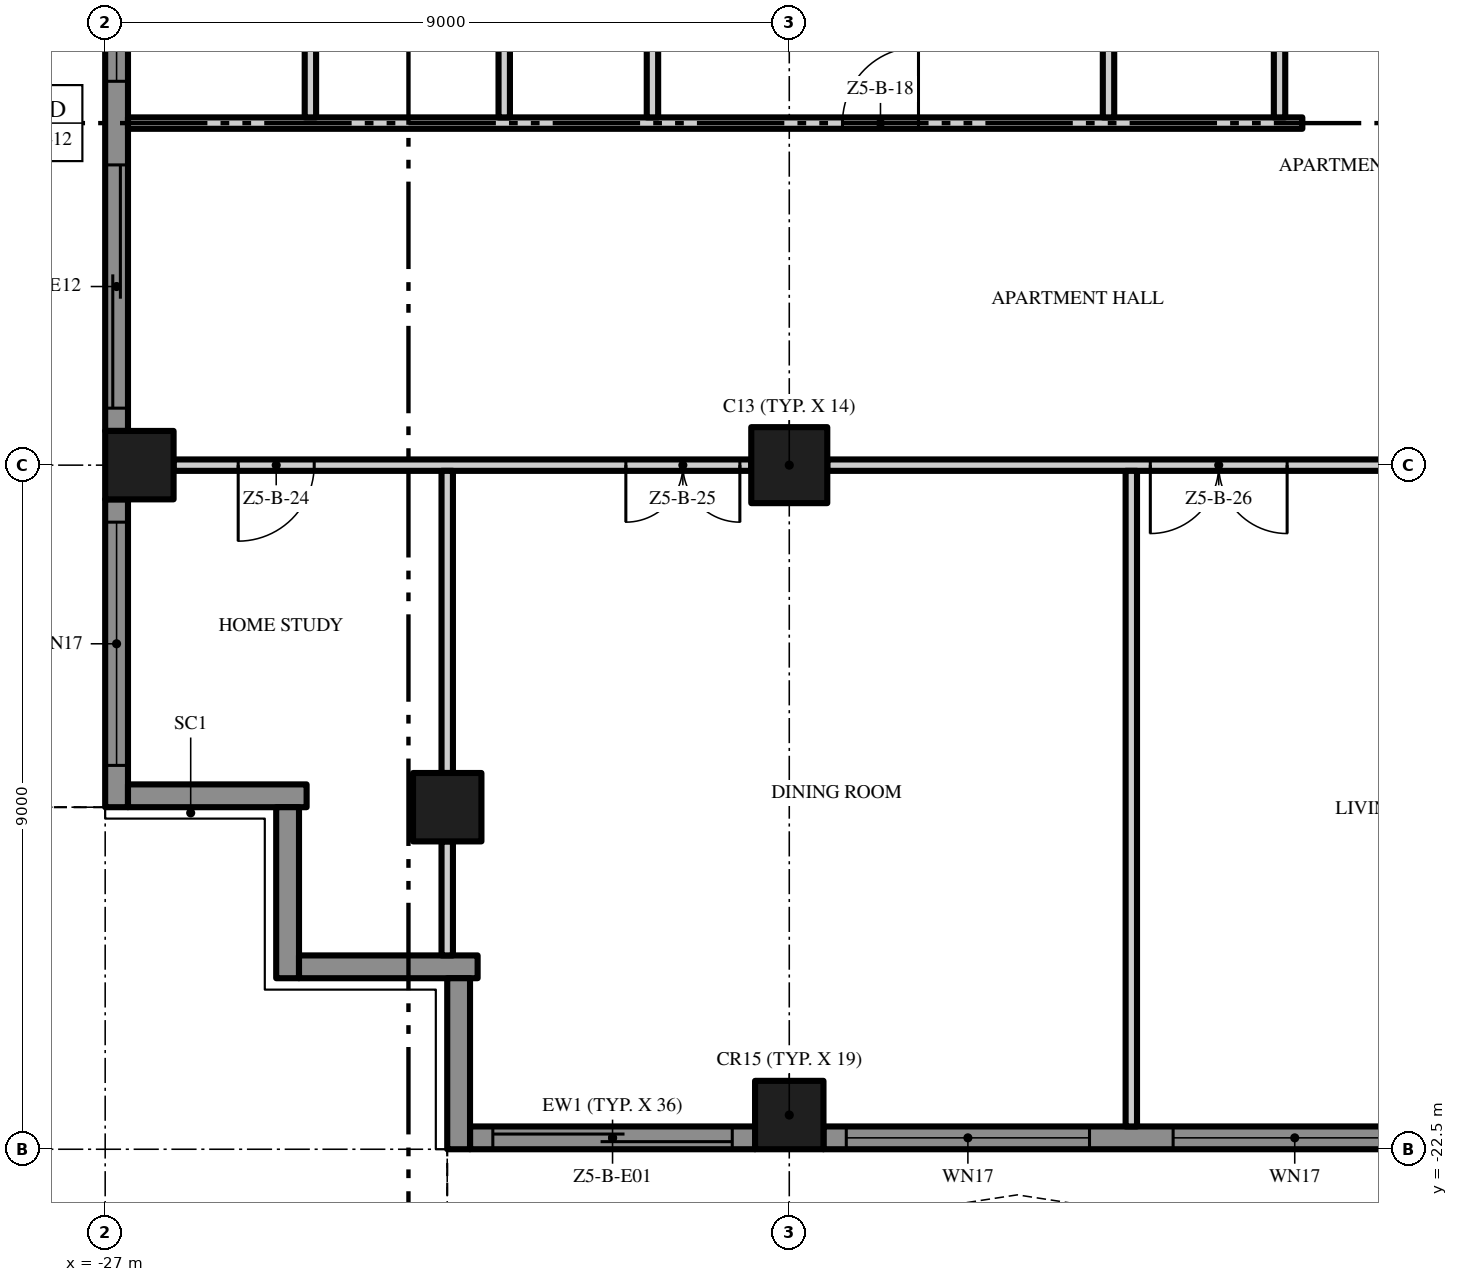
"""IFC4 building model, lengths in metres.
Left out: names, types, materials, properties, quantities, classifications, styles, units other than length and angle.
Written with IfcOpenShell. Run it as: python <this file> out.ifc"""

import sys

from ifc_helpers import new_model, si_unit, direction, frame, frame_2d, origin, origin_2d, place, context, subcontext, project, spatial, polyline, rectangle, outline, extrude, element, fill, save


model = new_model("IFC4")
c1 = context("Model", 3, precision=1e-05, world=origin(), true_north=direction((0.0, 1.0)))
c2 = subcontext(c1, "Body", "Model", "MODEL_VIEW")
j1 = project(units=[si_unit("LENGTHUNIT", "METRE"), si_unit("PLANEANGLEUNIT", "RADIAN")], contexts=[c1])
p1 = place(None, origin())
s1 = spatial("IfcSite", under=j1, at=p1, CompositionType="ELEMENT")
p2 = place(p1, origin())
s2 = spatial("IfcBuilding", under=s1, at=p2, CompositionType="ELEMENT")
p3 = place(p2, frame((0.0, 0.0, 250.2)))
s3 = spatial("IfcBuildingStorey", under=s2, at=p3, CompositionType="ELEMENT", Elevation=250.2)
p4 = place(p3, frame((-18.0, -13.5, 0.0), z_axis=(0.0, 0.0, 1.0), x_axis=(1.0, 0.0, 0.0)))
e1 = element("IfcColumn", 1, at=p4, inside=s3, PredefinedType="COLUMN", context=c2, shape_type="SweptSolid", body=[
    extrude(rectangle(XDim=1.0, YDim=1.0, at=origin_2d()), origin(), (0.0, 0.0, 1.0), 3.5),
])
for number, where, z_axis, x_axis in (
    (2, (-18.0, -22.05, 0.0), (0.0, 0.0, 1.0), (1.0, 0.0, 0.0)),
    (3, (-26.55, -13.5, 0.0), (0.0, 0.0, 1.0), (1.0, 0.0, 0.0)),
    (4, (-22.5, -18.0, 0.0), (0.0, 0.0, 1.0), (1.0, 0.0, 0.0)),
):
    element("IfcColumn", number, at=place(p3, frame(where, z_axis=z_axis, x_axis=x_axis)), inside=s3, PredefinedType="COLUMN", context=c2, shape_type="SweptSolid", body=[
        extrude(rectangle(XDim=0.9, YDim=0.9, at=origin_2d()), origin(), (0.0, 0.0, 1.0), 3.5),
    ])
p5 = place(p3, frame((-18.45, -22.35, 0.0), z_axis=(0.0, 0.0, 1.0), x_axis=(-1.0, 0.0, 0.0)))
e5 = element("IfcWall", 5, at=p5, inside=s3, PredefinedType="SOLIDWALL", context=c2, shape_type="SweptSolid", body=[
    extrude(rectangle(XDim=3.75, YDim=0.3, at=frame_2d((1.875, 0.0))), origin(), (0.0, 0.0, 1.0), 3.5),
])
p6 = place(p5, frame((0.3, 0.0, 0.0)))
e6 = element("IfcOpeningElement", 6, at=p6, cuts=e5, PredefinedType="OPENING", context=c2, shape_type="SweptSolid", body=[
    extrude(rectangle(XDim=3.15, YDim=2.4, at=frame_2d((1.575, 1.2))), frame((0.0, 0.16, 0.0), z_axis=(0.0, -1.0, 0.0), x_axis=(1.0, 0.0, 0.0)), (0.0, 0.0, 1.0), 0.32),
])
p7 = place(p3, frame((-9.45, -22.35, 0.0), z_axis=(0.0, 0.0, 1.0), x_axis=(-1.0, 0.0, 0.0)))
e7 = element("IfcWall", 7, at=p7, inside=s3, PredefinedType="SOLIDWALL", context=c2, shape_type="SweptSolid", body=[
    extrude(rectangle(XDim=8.1, YDim=0.3, at=frame_2d((4.05, 0.0))), origin(), (0.0, 0.0, 1.0), 3.5),
])
p8 = place(p7, frame((4.6, 0.0, 0.45)))
e8 = element("IfcOpeningElement", 8, at=p8, cuts=e7, PredefinedType="OPENING", context=c2, shape_type="SweptSolid", body=[
    extrude(rectangle(XDim=3.2, YDim=2.65, at=frame_2d((1.6, 1.325))), frame((0.0, 0.16, 0.0), z_axis=(0.0, -1.0, 0.0), x_axis=(1.0, 0.0, 0.0)), (0.0, 0.0, 1.0), 0.32),
])
p9 = place(p7, frame((0.3, 0.0, 0.45)))
e9 = element("IfcOpeningElement", 9, at=p9, cuts=e7, PredefinedType="OPENING", context=c2, shape_type="SweptSolid", body=[
    extrude(rectangle(XDim=3.2, YDim=2.65, at=frame_2d((1.6, 1.325))), frame((0.0, 0.16, 0.0), z_axis=(0.0, -1.0, 0.0), x_axis=(1.0, 0.0, 0.0)), (0.0, 0.0, 1.0), 0.32),
])
p10 = place(p3, frame((-26.85, -13.05, 0.0), z_axis=(0.0, 0.0, 1.0), x_axis=(0.0, 1.0, 0.0)))
e10 = element("IfcWall", 10, at=p10, inside=s3, PredefinedType="SOLIDWALL", context=c2, shape_type="SweptSolid", body=[
    extrude(rectangle(XDim=8.1, YDim=0.3, at=frame_2d((4.05, 0.0))), origin(), (0.0, 0.0, 1.0), 3.5),
])
p11 = place(p10, frame((4.6, 0.0, 0.45)))
e11 = element("IfcOpeningElement", 11, at=p11, cuts=e10, PredefinedType="OPENING", context=c2, shape_type="SweptSolid", body=[
    extrude(rectangle(XDim=3.2, YDim=2.65, at=frame_2d((1.6, 1.325))), frame((0.0, 0.16, 0.0), z_axis=(0.0, -1.0, 0.0), x_axis=(1.0, 0.0, 0.0)), (0.0, 0.0, 1.0), 0.32),
])
p12 = place(p10, frame((0.3, 0.0, 0.0)))
e12 = element("IfcOpeningElement", 12, at=p12, cuts=e10, PredefinedType="OPENING", context=c2, shape_type="SweptSolid", body=[
    extrude(rectangle(XDim=3.2, YDim=2.4, at=frame_2d((1.6, 1.2))), frame((0.0, 0.16, 0.0), z_axis=(0.0, -1.0, 0.0), x_axis=(1.0, 0.0, 0.0)), (0.0, 0.0, 1.0), 0.32),
])
p13 = place(p3, frame((-26.85, -18.0, 0.0), z_axis=(0.0, 0.0, 1.0), x_axis=(0.0, 1.0, 0.0)))
e13 = element("IfcWall", 13, at=p13, inside=s3, PredefinedType="SOLIDWALL", context=c2, shape_type="SweptSolid", body=[
    extrude(rectangle(XDim=4.05, YDim=0.3, at=frame_2d((2.025, 0.0))), origin(), (0.0, 0.0, 1.0), 3.5),
])
p14 = place(p13, frame((0.55, 0.0, 0.45)))
e14 = element("IfcOpeningElement", 14, at=p14, cuts=e13, PredefinedType="OPENING", context=c2, shape_type="SweptSolid", body=[
    extrude(rectangle(XDim=3.2, YDim=2.65, at=frame_2d((1.6, 1.325))), frame((0.0, 0.16, 0.0), z_axis=(0.0, -1.0, 0.0), x_axis=(1.0, 0.0, 0.0)), (0.0, 0.0, 1.0), 0.32),
])
p15 = place(p3, frame((-24.35, -17.85, 0.0), z_axis=(0.0, 0.0, 1.0), x_axis=(-1.0, 0.0, 0.0)))
e15 = element("IfcWall", 15, at=p15, inside=s3, PredefinedType="SOLIDWALL", context=c2, shape_type="SweptSolid", body=[
    extrude(rectangle(XDim=2.35, YDim=0.3, at=frame_2d((1.175, 0.0))), origin(), (0.0, 0.0, 1.0), 3.5),
])
p16 = place(p3, frame((-24.6, -20.25, 0.0), z_axis=(0.0, 0.0, 1.0), x_axis=(0.0, 1.0, 0.0)))
e16 = element("IfcWall", 16, at=p16, inside=s3, PredefinedType="SOLIDWALL", context=c2, shape_type="SweptSolid", body=[
    extrude(rectangle(XDim=2.25, YDim=0.3, at=frame_2d((1.125, 0.0))), origin(), (0.0, 0.0, 1.0), 3.5),
])
p17 = place(p3, frame((-22.1, -20.1, 0.0), z_axis=(0.0, 0.0, 1.0), x_axis=(-1.0, 0.0, 0.0)))
e17 = element("IfcWall", 17, at=p17, inside=s3, PredefinedType="SOLIDWALL", context=c2, shape_type="SweptSolid", body=[
    extrude(rectangle(XDim=2.35, YDim=0.3, at=frame_2d((1.175, 0.0))), origin(), (0.0, 0.0, 1.0), 3.5),
])
p18 = place(p3, frame((-22.35, -22.5, 0.0), z_axis=(0.0, 0.0, 1.0), x_axis=(0.0, 1.0, 0.0)))
e18 = element("IfcWall", 18, at=p18, inside=s3, PredefinedType="SOLIDWALL", context=c2, shape_type="SweptSolid", body=[
    extrude(rectangle(XDim=2.25, YDim=0.3, at=frame_2d((1.125, 0.0))), origin(), (0.0, 0.0, 1.0), 3.5),
])
p19 = place(p3, origin())
e19 = element("IfcWall", 19, at=p19, inside=s3, PredefinedType="USERDEFINED", context=c2, shape_type="SweptSolid", body=[
    extrude(outline(polyline([(-22.5, -25.5), (-21.0, -25.271), (-19.5, -24.671), (-18.0, -23.929), (-16.5, -23.329), (-15.0, -23.1), (-13.5, -23.329), (-12.0, -23.929), (-10.5, -24.671), (-9.0, -25.271), (-7.5, -25.5), (-6.0, -25.271), (-4.5, -24.671), (-3.0, -23.929), (-1.5, -23.329), (0.0, -23.1), (1.5, -23.329), (3.0, -23.929), (4.5, -24.671), (6.0, -25.271), (7.5, -25.5), (9.0, -25.271), (10.5, -24.671), (12.0, -23.929), (13.5, -23.329), (15.0, -23.1), (16.5, -23.329), (18.0, -23.929), (19.5, -24.671), (21.0, -25.271), (22.5, -25.5), (22.538, -25.253), (21.066, -25.028), (19.602, -24.442), (18.102, -23.701), (16.566, -23.086), (15.0, -22.847), (13.434, -23.086), (11.898, -23.701), (10.398, -24.442), (8.934, -25.028), (7.5, -25.247), (6.066, -25.028), (4.602, -24.442), (3.102, -23.701), (1.566, -23.086), (0.0, -22.847), (-1.566, -23.086), (-3.102, -23.701), (-4.602, -24.442), (-6.066, -25.028), (-7.5, -25.247), (-8.934, -25.028), (-10.398, -24.442), (-11.898, -23.701), (-13.434, -23.086), (-15.0, -22.847), (-16.566, -23.086), (-18.102, -23.701), (-19.602, -24.442), (-21.066, -25.028), (-22.538, -25.253), (-22.5, -25.5)])), origin(), (0.0, 0.0, 1.0), 0.9),
])
p20 = place(p3, origin())
e20 = element("IfcWall", 20, at=p20, inside=s3, PredefinedType="USERDEFINED", context=c2, shape_type="SweptSolid", body=[
    extrude(outline(polyline([(-30.0, 18.0), (-29.771, 16.5), (-29.171, 15.0), (-28.429, 13.5), (-27.829, 12.0), (-27.6, 10.5), (-27.829, 9.0), (-28.429, 7.5), (-29.171, 6.0), (-29.771, 4.5), (-30.0, 3.0), (-29.771, 1.5), (-29.171, 0.0), (-28.429, -1.5), (-27.829, -3.0), (-27.6, -4.5), (-27.829, -6.0), (-28.429, -7.5), (-29.171, -9.0), (-29.771, -10.5), (-30.0, -12.0), (-29.771, -13.5), (-29.171, -15.0), (-28.429, -16.5), (-27.829, -18.0), (-27.597, -17.907), (-28.201, -16.398), (-28.942, -14.898), (-29.528, -13.434), (-29.747, -12.0), (-29.528, -10.566), (-28.942, -9.102), (-28.201, -7.602), (-27.586, -6.066), (-27.347, -4.5), (-27.586, -2.934), (-28.201, -1.398), (-28.942, 0.102), (-29.528, 1.566), (-29.747, 3.0), (-29.528, 4.434), (-28.942, 5.898), (-28.201, 7.398), (-27.586, 8.934), (-27.347, 10.5), (-27.586, 12.066), (-28.201, 13.602), (-28.942, 15.102), (-29.528, 16.566), (-29.753, 18.038), (-30.0, 18.0)])), origin(), (0.0, 0.0, 1.0), 0.9),
])
p21 = place(p3, frame((-18.5, -13.5, 0.0), z_axis=(0.0, 0.0, 1.0), x_axis=(-1.0, 0.0, 0.0)))
e21 = element("IfcWall", 21, at=p21, inside=s3, PredefinedType="PARTITIONING", context=c2, shape_type="SweptSolid", body=[
    extrude(rectangle(XDim=7.6, YDim=0.15, at=frame_2d((3.8, 0.0))), origin(), (0.0, 0.0, 1.0), 3.5),
])
p22 = place(p21, frame((5.75, 0.0, 0.0)))
e22 = element("IfcOpeningElement", 22, at=p22, cuts=e21, PredefinedType="OPENING", context=c2, shape_type="SweptSolid", body=[
    extrude(rectangle(XDim=1.0, YDim=2.4, at=frame_2d((0.5, 1.2))), frame((0.0, 0.085, 0.0), z_axis=(0.0, -1.0, 0.0), x_axis=(1.0, 0.0, 0.0)), (0.0, 0.0, 1.0), 0.17),
])
p23 = place(p21, frame((0.15, 0.0, 0.0)))
e23 = element("IfcOpeningElement", 23, at=p23, cuts=e21, PredefinedType="OPENING", context=c2, shape_type="SweptSolid", body=[
    extrude(rectangle(XDim=1.5, YDim=2.4, at=frame_2d((0.75, 1.2))), frame((0.0, 0.085, 0.0), z_axis=(0.0, -1.0, 0.0), x_axis=(1.0, 0.0, 0.0)), (0.0, 0.0, 1.0), 0.17),
])
p24 = place(p3, frame((-9.5, -13.5, 0.0), z_axis=(0.0, 0.0, 1.0), x_axis=(-1.0, 0.0, 0.0)))
e24 = element("IfcWall", 24, at=p24, inside=s3, PredefinedType="PARTITIONING", context=c2, shape_type="SweptSolid", body=[
    extrude(rectangle(XDim=8.0, YDim=0.15, at=frame_2d((4.0, 0.0))), origin(), (0.0, 0.0, 1.0), 3.5),
])
p25 = place(p24, frame((1.95, 0.0, 0.0)))
e25 = element("IfcOpeningElement", 25, at=p25, cuts=e24, PredefinedType="OPENING", context=c2, shape_type="SweptSolid", body=[
    extrude(rectangle(XDim=1.8, YDim=2.4, at=frame_2d((0.9, 1.2))), frame((0.0, 0.085, 0.0), z_axis=(0.0, -1.0, 0.0), x_axis=(1.0, 0.0, 0.0)), (0.0, 0.0, 1.0), 0.17),
])
p26 = place(p3, frame((-26.7, -9.0, 0.0), z_axis=(0.0, 0.0, 1.0), x_axis=(1.0, 0.0, 0.0)))
e26 = element("IfcWall", 26, at=p26, inside=s3, PredefinedType="PARTITIONING", context=c2, shape_type="SweptSolid", body=[
    extrude(rectangle(XDim=15.45, YDim=0.15, at=frame_2d((7.725, 0.0))), origin(), (0.0, 0.0, 1.0), 3.5),
])
p27 = place(p26, frame((9.4, 0.0, 0.0)))
e27 = element("IfcOpeningElement", 27, at=p27, cuts=e26, PredefinedType="OPENING", context=c2, shape_type="SweptSolid", body=[
    extrude(rectangle(XDim=1.0, YDim=2.4, at=frame_2d((0.5, 1.2))), frame((0.0, 0.085, 0.0), z_axis=(0.0, -1.0, 0.0), x_axis=(1.0, 0.0, 0.0)), (0.0, 0.0, 1.0), 0.17),
])
p28 = place(p3, frame((-24.3, -8.925, 0.0), z_axis=(0.0, 0.0, 1.0), x_axis=(0.0, 1.0, 0.0)))
e28 = element("IfcWall", 28, at=p28, inside=s3, PredefinedType="PARTITIONING", context=c2, shape_type="SweptSolid", body=[
    extrude(rectangle(XDim=4.35, YDim=0.15, at=frame_2d((2.175, 0.0))), origin(), (0.0, 0.0, 1.0), 3.5),
])
p29 = place(p3, frame((-22.5, -19.95, 0.0), z_axis=(0.0, 0.0, 1.0), x_axis=(0.0, 1.0, 0.0)))
e29 = element("IfcWall", 29, at=p29, inside=s3, PredefinedType="PARTITIONING", context=c2, shape_type="SweptSolid", body=[
    extrude(rectangle(XDim=1.5, YDim=0.15, at=frame_2d((0.75, 0.0))), origin(), (0.0, 0.0, 1.0), 3.5),
])
p30 = place(p3, frame((-22.5, -17.55, 0.0), z_axis=(0.0, 0.0, 1.0), x_axis=(0.0, 1.0, 0.0)))
e30 = element("IfcWall", 30, at=p30, inside=s3, PredefinedType="PARTITIONING", context=c2, shape_type="SweptSolid", body=[
    extrude(rectangle(XDim=3.975, YDim=0.15, at=frame_2d((1.988, 0.0))), origin(), (0.0, 0.0, 1.0), 3.5),
])
for number, where, z_axis, x_axis in (
    (31, (-21.75, -8.925, 0.0), (0.0, 0.0, 1.0), (0.0, 1.0, 0.0)),
    (32, (-19.8, -8.925, 0.0), (0.0, 0.0, 1.0), (0.0, 1.0, 0.0)),
    (33, (-13.8, -8.925, 0.0), (0.0, 0.0, 1.0), (0.0, 1.0, 0.0)),
):
    element("IfcWall", number, at=place(p3, frame(where, z_axis=z_axis, x_axis=x_axis)), inside=s3, PredefinedType="PARTITIONING", context=c2, shape_type="SweptSolid", body=[
        extrude(rectangle(XDim=4.35, YDim=0.15, at=frame_2d((2.175, 0.0))), origin(), (0.0, 0.0, 1.0), 3.5),
    ])
p31 = place(p3, frame((-13.5, -22.2, 0.0), z_axis=(0.0, 0.0, 1.0), x_axis=(0.0, 1.0, 0.0)))
e34 = element("IfcWall", 34, at=p31, inside=s3, PredefinedType="PARTITIONING", context=c2, shape_type="SweptSolid", body=[
    extrude(rectangle(XDim=8.625, YDim=0.15, at=frame_2d((4.312, 0.0))), origin(), (0.0, 0.0, 1.0), 3.5),
])
p32 = place(p3, frame((-11.55, -8.925, 0.0), z_axis=(0.0, 0.0, 1.0), x_axis=(0.0, 1.0, 0.0)))
e35 = element("IfcWall", 35, at=p32, inside=s3, PredefinedType="PARTITIONING", context=c2, shape_type="SweptSolid", body=[
    extrude(rectangle(XDim=4.5, YDim=0.15, at=frame_2d((2.25, 0.0))), origin(), (0.0, 0.0, 1.0), 3.5),
])
p33 = place(p32, frame((1.75, 0.0, 0.0)))
e36 = element("IfcOpeningElement", 36, at=p33, cuts=e35, PredefinedType="OPENING", context=c2, shape_type="SweptSolid", body=[
    extrude(rectangle(XDim=0.9, YDim=2.1, at=frame_2d((0.45, 1.05))), frame((0.0, 0.085, 0.0), z_axis=(0.0, -1.0, 0.0), x_axis=(1.0, 0.0, 0.0)), (0.0, 0.0, 1.0), 0.17),
])
p34 = place(p6, origin())
e37 = element("IfcDoor", 37, at=p34, inside=s3, OperationType="SINGLE_SWING_LEFT", PredefinedType="DOOR", context=c2, shape_type="SweptSolid", body=[
    extrude(rectangle(XDim=3.15, YDim=2.4, at=frame_2d((1.575, 1.2))), frame((0.0, 0.025, 0.0), z_axis=(0.0, -1.0, 0.0), x_axis=(1.0, 0.0, 0.0)), (0.0, 0.0, 1.0), 0.05),
])
fill(e6, e37)
p35 = place(p8, origin())
e38 = element("IfcWindow", 38, at=p35, inside=s3, PartitioningType="SINGLE_PANEL", PredefinedType="WINDOW", context=c2, shape_type="SweptSolid", body=[
    extrude(rectangle(XDim=3.2, YDim=2.65, at=frame_2d((1.6, 1.325))), frame((0.0, 0.03, 0.0), z_axis=(0.0, -1.0, 0.0), x_axis=(1.0, 0.0, 0.0)), (0.0, 0.0, 1.0), 0.06),
])
fill(e8, e38)
p36 = place(p9, origin())
e39 = element("IfcWindow", 39, at=p36, inside=s3, PartitioningType="SINGLE_PANEL", PredefinedType="WINDOW", context=c2, shape_type="SweptSolid", body=[
    extrude(rectangle(XDim=3.2, YDim=2.65, at=frame_2d((1.6, 1.325))), frame((0.0, 0.03, 0.0), z_axis=(0.0, -1.0, 0.0), x_axis=(1.0, 0.0, 0.0)), (0.0, 0.0, 1.0), 0.06),
])
fill(e9, e39)
p37 = place(p11, origin())
e40 = element("IfcWindow", 40, at=p37, inside=s3, PartitioningType="SINGLE_PANEL", PredefinedType="WINDOW", context=c2, shape_type="SweptSolid", body=[
    extrude(rectangle(XDim=3.2, YDim=2.65, at=frame_2d((1.6, 1.325))), frame((0.0, 0.03, 0.0), z_axis=(0.0, -1.0, 0.0), x_axis=(1.0, 0.0, 0.0)), (0.0, 0.0, 1.0), 0.06),
])
fill(e11, e40)
p38 = place(p12, origin())
e41 = element("IfcDoor", 41, at=p38, inside=s3, OperationType="SINGLE_SWING_LEFT", PredefinedType="DOOR", context=c2, shape_type="SweptSolid", body=[
    extrude(rectangle(XDim=3.2, YDim=2.4, at=frame_2d((1.6, 1.2))), frame((0.0, 0.025, 0.0), z_axis=(0.0, -1.0, 0.0), x_axis=(1.0, 0.0, 0.0)), (0.0, 0.0, 1.0), 0.05),
])
fill(e12, e41)
p39 = place(p14, origin())
e42 = element("IfcWindow", 42, at=p39, inside=s3, PartitioningType="SINGLE_PANEL", PredefinedType="WINDOW", context=c2, shape_type="SweptSolid", body=[
    extrude(rectangle(XDim=3.2, YDim=2.65, at=frame_2d((1.6, 1.325))), frame((0.0, 0.03, 0.0), z_axis=(0.0, -1.0, 0.0), x_axis=(1.0, 0.0, 0.0)), (0.0, 0.0, 1.0), 0.06),
])
fill(e14, e42)
p40 = place(p27, origin())
e43 = element("IfcDoor", 43, at=p40, inside=s3, OperationType="SINGLE_SWING_RIGHT", PredefinedType="DOOR", context=c2, shape_type="SweptSolid", body=[
    extrude(rectangle(XDim=1.0, YDim=2.4, at=frame_2d((0.5, 1.2))), frame((0.0, 0.025, 0.0), z_axis=(0.0, -1.0, 0.0), x_axis=(1.0, 0.0, 0.0)), (0.0, 0.0, 1.0), 0.05),
])
fill(e27, e43)
p41 = place(p22, origin())
e44 = element("IfcDoor", 44, at=p41, inside=s3, OperationType="SINGLE_SWING_RIGHT", PredefinedType="DOOR", context=c2, shape_type="SweptSolid", body=[
    extrude(rectangle(XDim=1.0, YDim=2.4, at=frame_2d((0.5, 1.2))), frame((0.0, 0.025, 0.0), z_axis=(0.0, -1.0, 0.0), x_axis=(1.0, 0.0, 0.0)), (0.0, 0.0, 1.0), 0.05),
])
fill(e22, e44)
p42 = place(p23, origin())
e45 = element("IfcDoor", 45, at=p42, inside=s3, OperationType="DOUBLE_DOOR_SINGLE_SWING", PredefinedType="DOOR", context=c2, shape_type="SweptSolid", body=[
    extrude(rectangle(XDim=1.5, YDim=2.4, at=frame_2d((0.75, 1.2))), frame((0.0, 0.025, 0.0), z_axis=(0.0, -1.0, 0.0), x_axis=(1.0, 0.0, 0.0)), (0.0, 0.0, 1.0), 0.05),
])
fill(e23, e45)
p43 = place(p25, origin())
e46 = element("IfcDoor", 46, at=p43, inside=s3, OperationType="DOUBLE_DOOR_SINGLE_SWING", PredefinedType="DOOR", context=c2, shape_type="SweptSolid", body=[
    extrude(rectangle(XDim=1.8, YDim=2.4, at=frame_2d((0.9, 1.2))), frame((0.0, 0.025, 0.0), z_axis=(0.0, -1.0, 0.0), x_axis=(1.0, 0.0, 0.0)), (0.0, 0.0, 1.0), 0.05),
])
fill(e25, e46)
save(model, sys.argv[1])
